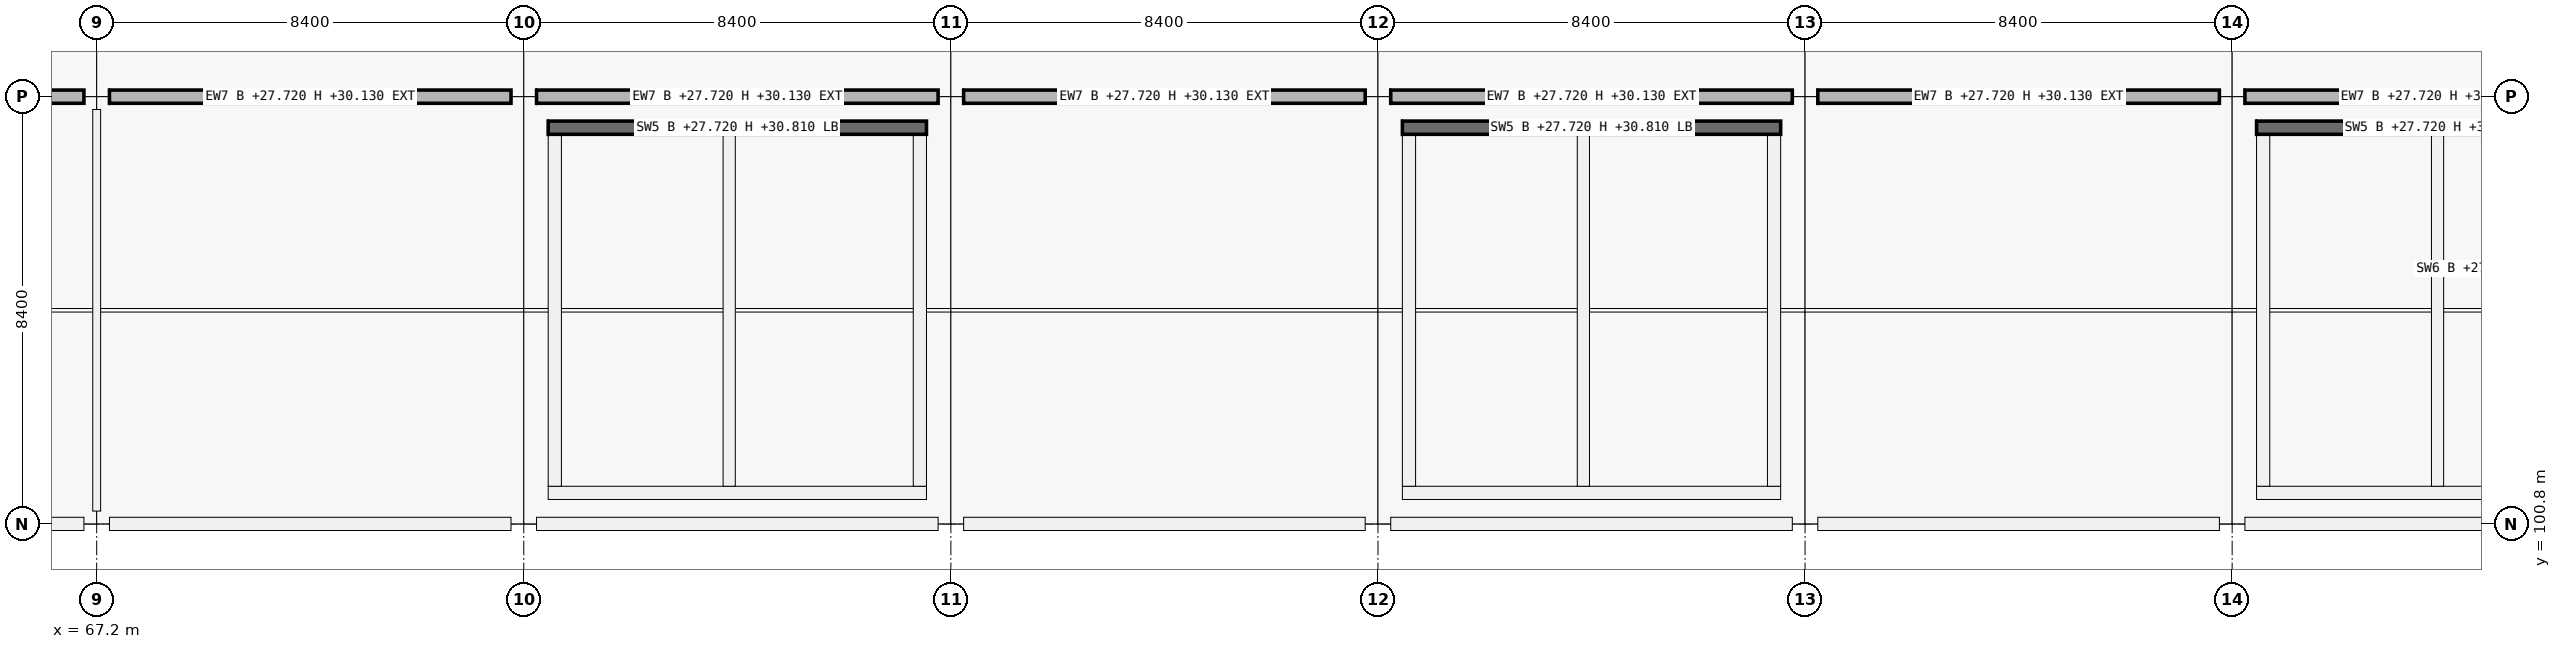
"""IFC4 building model, lengths in metres.
Left out: names, types, materials, properties, quantities, classifications, styles, units other than length and angle.
Written with IfcOpenShell. Run it as: python <this file> out.ifc"""

import sys

from ifc_helpers import new_model, si_unit, direction, frame, frame_2d, origin, origin_2d, place, context, subcontext, project, spatial, rectangle, extrude, element, fill, save


model = new_model("IFC4")
c1 = context("Model", 3, precision=1e-05, world=origin(), true_north=direction((0.0, 1.0)))
c2 = subcontext(c1, "Body", "Model", "MODEL_VIEW")
j1 = project(units=[si_unit("LENGTHUNIT", "METRE"), si_unit("PLANEANGLEUNIT", "RADIAN")], contexts=[c1])
p1 = place(None, origin())
s1 = spatial("IfcSite", under=j1, at=p1, CompositionType="ELEMENT")
p2 = place(p1, origin())
s2 = spatial("IfcBuilding", under=s1, at=p2, CompositionType="ELEMENT")
p3 = place(p2, frame((0.0, 0.0, 27.72)))
s3 = spatial("IfcBuildingStorey", under=s2, at=p3, CompositionType="ELEMENT", Elevation=27.72)
for number, where, z_axis, x_axis in (
    (1, (67.2, 100.8, 0.0), (0.0, 0.0, 1.0), (1.0, 0.0, 0.0)),
    (2, (67.2, 109.2, 0.0), (0.0, 0.0, 1.0), (1.0, 0.0, 0.0)),
    (3, (75.6, 100.8, 0.0), (0.0, 0.0, 1.0), (1.0, 0.0, 0.0)),
    (4, (75.6, 109.2, 0.0), (0.0, 0.0, 1.0), (1.0, 0.0, 0.0)),
    (5, (84.0, 100.8, 0.0), (0.0, 0.0, 1.0), (1.0, 0.0, 0.0)),
    (6, (84.0, 109.2, 0.0), (0.0, 0.0, 1.0), (1.0, 0.0, 0.0)),
    (7, (92.4, 100.8, 0.0), (0.0, 0.0, 1.0), (1.0, 0.0, 0.0)),
    (8, (92.4, 109.2, 0.0), (0.0, 0.0, 1.0), (1.0, 0.0, 0.0)),
    (9, (100.8, 100.8, 0.0), (0.0, 0.0, 1.0), (1.0, 0.0, 0.0)),
    (10, (100.8, 109.2, 0.0), (0.0, 0.0, 1.0), (1.0, 0.0, 0.0)),
    (11, (109.2, 100.8, 0.0), (0.0, 0.0, 1.0), (1.0, 0.0, 0.0)),
    (12, (109.2, 109.2, 0.0), (0.0, 0.0, 1.0), (1.0, 0.0, 0.0)),
):
    element("IfcColumn", number, at=place(p3, frame(where, z_axis=z_axis, x_axis=x_axis)), inside=s3, PredefinedType="COLUMN", context=c2, shape_type="SweptSolid", body=[
        extrude(rectangle(XDim=0.5, YDim=0.5, at=origin_2d()), origin(), (0.0, 0.0, 1.0), 3.09),
    ])
for number, where, z_axis, x_axis in (
    (13, (66.949, 100.8, 0.0), (0.0, 0.0, 1.0), (-1.0, 0.0, 0.0)),
    (14, (59.051, 109.2, 0.0), (0.0, 0.0, 1.0), (1.0, 0.0, 0.0)),
):
    element("IfcWall", number, at=place(p3, frame(where, z_axis=z_axis, x_axis=x_axis)), inside=s3, PredefinedType="SOLIDWALL", context=c2, shape_type="SweptSolid", body=[
        extrude(rectangle(XDim=7.898, YDim=0.26, at=frame_2d((3.949, 0.0))), origin(), (0.0, 0.0, 1.0), 2.41),
    ])
for number, where, z_axis, x_axis in (
    (15, (75.349, 100.8, 0.0), (0.0, 0.0, 1.0), (-1.0, 0.0, 0.0)),
    (16, (67.451, 109.2, 0.0), (0.0, 0.0, 1.0), (1.0, 0.0, 0.0)),
):
    element("IfcWall", number, at=place(p3, frame(where, z_axis=z_axis, x_axis=x_axis)), inside=s3, PredefinedType="SOLIDWALL", context=c2, shape_type="SweptSolid", body=[
        extrude(rectangle(XDim=7.898, YDim=0.26, at=frame_2d((3.949, 0.0))), origin(), (0.0, 0.0, 1.0), 2.41),
    ])
for number, where, z_axis, x_axis in (
    (17, (83.749, 100.8, 0.0), (0.0, 0.0, 1.0), (-1.0, 0.0, 0.0)),
    (18, (75.851, 109.2, 0.0), (0.0, 0.0, 1.0), (1.0, 0.0, 0.0)),
    (19, (92.149, 100.8, 0.0), (0.0, 0.0, 1.0), (-1.0, 0.0, 0.0)),
    (20, (84.251, 109.2, 0.0), (0.0, 0.0, 1.0), (1.0, 0.0, 0.0)),
):
    element("IfcWall", number, at=place(p3, frame(where, z_axis=z_axis, x_axis=x_axis)), inside=s3, PredefinedType="SOLIDWALL", context=c2, shape_type="SweptSolid", body=[
        extrude(rectangle(XDim=7.898, YDim=0.26, at=frame_2d((3.949, 0.0))), origin(), (0.0, 0.0, 1.0), 2.41),
    ])
for number, where, z_axis, x_axis in (
    (21, (100.549, 100.8, 0.0), (0.0, 0.0, 1.0), (-1.0, 0.0, 0.0)),
    (22, (92.651, 109.2, 0.0), (0.0, 0.0, 1.0), (1.0, 0.0, 0.0)),
):
    element("IfcWall", number, at=place(p3, frame(where, z_axis=z_axis, x_axis=x_axis)), inside=s3, PredefinedType="SOLIDWALL", context=c2, shape_type="SweptSolid", body=[
        extrude(rectangle(XDim=7.898, YDim=0.26, at=frame_2d((3.949, 0.0))), origin(), (0.0, 0.0, 1.0), 2.41),
    ])
for number, where, z_axis, x_axis in (
    (23, (108.949, 100.8, 0.0), (0.0, 0.0, 1.0), (-1.0, 0.0, 0.0)),
    (24, (101.051, 109.2, 0.0), (0.0, 0.0, 1.0), (1.0, 0.0, 0.0)),
):
    element("IfcWall", number, at=place(p3, frame(where, z_axis=z_axis, x_axis=x_axis)), inside=s3, PredefinedType="SOLIDWALL", context=c2, shape_type="SweptSolid", body=[
        extrude(rectangle(XDim=7.898, YDim=0.26, at=frame_2d((3.949, 0.0))), origin(), (0.0, 0.0, 1.0), 2.41),
    ])
for number, where, z_axis, x_axis in (
    (25, (117.349, 100.8, 0.0), (0.0, 0.0, 1.0), (-1.0, 0.0, 0.0)),
    (26, (109.451, 109.2, 0.0), (0.0, 0.0, 1.0), (1.0, 0.0, 0.0)),
):
    element("IfcWall", number, at=place(p3, frame(where, z_axis=z_axis, x_axis=x_axis)), inside=s3, PredefinedType="SOLIDWALL", context=c2, shape_type="SweptSolid", body=[
        extrude(rectangle(XDim=7.898, YDim=0.26, at=frame_2d((3.949, 0.0))), origin(), (0.0, 0.0, 1.0), 2.41),
    ])
p4 = place(p3, frame((117.12, 101.41, 0.0), z_axis=(0.0, 0.0, 1.0), x_axis=(-1.0, 0.0, 0.0)))
e27 = element("IfcWall", 27, at=p4, inside=s3, PredefinedType="SHEAR", context=c2, shape_type="SweptSolid", body=[
    extrude(rectangle(XDim=7.44, YDim=0.26, at=frame_2d((3.72, 0.0))), origin(), (0.0, 0.0, 1.0), 3.09),
])
p5 = place(p3, frame((109.81, 101.54, 0.0), z_axis=(0.0, 0.0, 1.0), x_axis=(0.0, 1.0, 0.0)))
e28 = element("IfcWall", 28, at=p5, inside=s3, PredefinedType="SHEAR", context=c2, shape_type="SweptSolid", body=[
    extrude(rectangle(XDim=6.92, YDim=0.26, at=frame_2d((3.46, 0.0))), origin(), (0.0, 0.0, 1.0), 3.09),
])
p6 = place(p3, frame((109.68, 108.59, 0.0), z_axis=(0.0, 0.0, 1.0), x_axis=(1.0, 0.0, 0.0)))
e29 = element("IfcWall", 29, at=p6, inside=s3, PredefinedType="SHEAR", context=c2, shape_type="SweptSolid", body=[
    extrude(rectangle(XDim=7.44, YDim=0.26, at=frame_2d((3.72, 0.0))), origin(), (0.0, 0.0, 1.0), 3.09),
])
p7 = place(p3, frame((113.24, 101.54, 0.0), z_axis=(0.0, 0.0, 1.0), x_axis=(0.0, 1.0, 0.0)))
e30 = element("IfcWall", 30, at=p7, inside=s3, PredefinedType="SHEAR", context=c2, shape_type="SweptSolid", body=[
    extrude(rectangle(XDim=6.92, YDim=0.24, at=frame_2d((3.46, 0.0))), origin(), (0.0, 0.0, 1.0), 3.09),
])
p8 = place(p7, frame((0.12, 0.0, 0.0)))
e31 = element("IfcOpeningElement", 31, at=p8, cuts=e30, PredefinedType="OPENING", context=c2, shape_type="SweptSolid", body=[
    extrude(rectangle(XDim=1.0, YDim=2.15, at=frame_2d((0.5, 1.075))), frame((0.0, 0.12, 0.0), z_axis=(0.0, -1.0, 0.0), x_axis=(1.0, 0.0, 0.0)), (0.0, 0.0, 1.0), 0.24),
])
p9 = place(p3, frame((113.36, 105.82, 0.0), z_axis=(0.0, 0.0, 1.0), x_axis=(1.0, 0.0, 0.0)))
e32 = element("IfcWall", 32, at=p9, inside=s3, PredefinedType="SHEAR", context=c2, shape_type="SweptSolid", body=[
    extrude(rectangle(XDim=3.5, YDim=0.24, at=frame_2d((1.75, 0.0))), origin(), (0.0, 0.0, 1.0), 3.09),
])
p10 = place(p9, frame((1.15, 0.0, 0.0)))
e33 = element("IfcOpeningElement", 33, at=p10, cuts=e32, PredefinedType="OPENING", context=c2, shape_type="SweptSolid", body=[
    extrude(rectangle(XDim=1.2, YDim=2.2, at=frame_2d((0.6, 1.1))), frame((0.0, 0.12, 0.0), z_axis=(0.0, -1.0, 0.0), x_axis=(1.0, 0.0, 0.0)), (0.0, 0.0, 1.0), 0.24),
])
p11 = place(p3, frame((83.52, 101.41, 0.0), z_axis=(0.0, 0.0, 1.0), x_axis=(-1.0, 0.0, 0.0)))
e34 = element("IfcWall", 34, at=p11, inside=s3, PredefinedType="SHEAR", context=c2, shape_type="SweptSolid", body=[
    extrude(rectangle(XDim=7.44, YDim=0.26, at=frame_2d((3.72, 0.0))), origin(), (0.0, 0.0, 1.0), 3.09),
])
p12 = place(p3, frame((76.21, 101.54, 0.0), z_axis=(0.0, 0.0, 1.0), x_axis=(0.0, 1.0, 0.0)))
e35 = element("IfcWall", 35, at=p12, inside=s3, PredefinedType="SHEAR", context=c2, shape_type="SweptSolid", body=[
    extrude(rectangle(XDim=6.92, YDim=0.26, at=frame_2d((3.46, 0.0))), origin(), (0.0, 0.0, 1.0), 3.09),
])
p13 = place(p3, frame((76.08, 108.59, 0.0), z_axis=(0.0, 0.0, 1.0), x_axis=(1.0, 0.0, 0.0)))
e36 = element("IfcWall", 36, at=p13, inside=s3, PredefinedType="SHEAR", context=c2, shape_type="SweptSolid", body=[
    extrude(rectangle(XDim=7.44, YDim=0.26, at=frame_2d((3.72, 0.0))), origin(), (0.0, 0.0, 1.0), 3.09),
])
p14 = place(p3, frame((83.39, 108.46, 0.0), z_axis=(0.0, 0.0, 1.0), x_axis=(0.0, -1.0, 0.0)))
e37 = element("IfcWall", 37, at=p14, inside=s3, PredefinedType="SHEAR", context=c2, shape_type="SweptSolid", body=[
    extrude(rectangle(XDim=6.92, YDim=0.26, at=frame_2d((3.46, 0.0))), origin(), (0.0, 0.0, 1.0), 3.09),
])
p15 = place(p14, frame((4.01, 0.0, 0.0)))
e38 = element("IfcOpeningElement", 38, at=p15, cuts=e37, PredefinedType="OPENING", context=c2, shape_type="SweptSolid", body=[
    extrude(rectangle(XDim=1.5, YDim=2.15, at=frame_2d((0.75, 1.075))), frame((0.0, 0.13, 0.0), z_axis=(0.0, -1.0, 0.0), x_axis=(1.0, 0.0, 0.0)), (0.0, 0.0, 1.0), 0.26),
])
p16 = place(p3, frame((79.64, 101.54, 0.0), z_axis=(0.0, 0.0, 1.0), x_axis=(0.0, 1.0, 0.0)))
e39 = element("IfcWall", 39, at=p16, inside=s3, PredefinedType="SHEAR", context=c2, shape_type="SweptSolid", body=[
    extrude(rectangle(XDim=6.92, YDim=0.24, at=frame_2d((3.46, 0.0))), origin(), (0.0, 0.0, 1.0), 3.09),
])
p17 = place(p16, frame((0.12, 0.0, 0.0)))
e40 = element("IfcOpeningElement", 40, at=p17, cuts=e39, PredefinedType="OPENING", context=c2, shape_type="SweptSolid", body=[
    extrude(rectangle(XDim=1.0, YDim=2.15, at=frame_2d((0.5, 1.075))), frame((0.0, 0.12, 0.0), z_axis=(0.0, -1.0, 0.0), x_axis=(1.0, 0.0, 0.0)), (0.0, 0.0, 1.0), 0.24),
])
p18 = place(p3, frame((100.32, 101.41, 0.0), z_axis=(0.0, 0.0, 1.0), x_axis=(-1.0, 0.0, 0.0)))
e41 = element("IfcWall", 41, at=p18, inside=s3, PredefinedType="SHEAR", context=c2, shape_type="SweptSolid", body=[
    extrude(rectangle(XDim=7.44, YDim=0.26, at=frame_2d((3.72, 0.0))), origin(), (0.0, 0.0, 1.0), 3.09),
])
p19 = place(p3, frame((93.01, 101.54, 0.0), z_axis=(0.0, 0.0, 1.0), x_axis=(0.0, 1.0, 0.0)))
e42 = element("IfcWall", 42, at=p19, inside=s3, PredefinedType="SHEAR", context=c2, shape_type="SweptSolid", body=[
    extrude(rectangle(XDim=6.92, YDim=0.26, at=frame_2d((3.46, 0.0))), origin(), (0.0, 0.0, 1.0), 3.09),
])
p20 = place(p3, frame((92.88, 108.59, 0.0), z_axis=(0.0, 0.0, 1.0), x_axis=(1.0, 0.0, 0.0)))
e43 = element("IfcWall", 43, at=p20, inside=s3, PredefinedType="SHEAR", context=c2, shape_type="SweptSolid", body=[
    extrude(rectangle(XDim=7.44, YDim=0.26, at=frame_2d((3.72, 0.0))), origin(), (0.0, 0.0, 1.0), 3.09),
])
p21 = place(p3, frame((100.19, 108.46, 0.0), z_axis=(0.0, 0.0, 1.0), x_axis=(0.0, -1.0, 0.0)))
e44 = element("IfcWall", 44, at=p21, inside=s3, PredefinedType="SHEAR", context=c2, shape_type="SweptSolid", body=[
    extrude(rectangle(XDim=6.92, YDim=0.26, at=frame_2d((3.46, 0.0))), origin(), (0.0, 0.0, 1.0), 3.09),
])
p22 = place(p21, frame((4.01, 0.0, 0.0)))
e45 = element("IfcOpeningElement", 45, at=p22, cuts=e44, PredefinedType="OPENING", context=c2, shape_type="SweptSolid", body=[
    extrude(rectangle(XDim=1.5, YDim=2.15, at=frame_2d((0.75, 1.075))), frame((0.0, 0.13, 0.0), z_axis=(0.0, -1.0, 0.0), x_axis=(1.0, 0.0, 0.0)), (0.0, 0.0, 1.0), 0.26),
])
p23 = place(p3, frame((96.44, 101.54, 0.0), z_axis=(0.0, 0.0, 1.0), x_axis=(0.0, 1.0, 0.0)))
e46 = element("IfcWall", 46, at=p23, inside=s3, PredefinedType="SHEAR", context=c2, shape_type="SweptSolid", body=[
    extrude(rectangle(XDim=6.92, YDim=0.24, at=frame_2d((3.46, 0.0))), origin(), (0.0, 0.0, 1.0), 3.09),
])
p24 = place(p23, frame((0.12, 0.0, 0.0)))
e47 = element("IfcOpeningElement", 47, at=p24, cuts=e46, PredefinedType="OPENING", context=c2, shape_type="SweptSolid", body=[
    extrude(rectangle(XDim=1.0, YDim=2.15, at=frame_2d((0.5, 1.075))), frame((0.0, 0.12, 0.0), z_axis=(0.0, -1.0, 0.0), x_axis=(1.0, 0.0, 0.0)), (0.0, 0.0, 1.0), 0.24),
])
p25 = place(p3, frame((67.2, 101.052, 0.0), z_axis=(0.0, 0.0, 1.0), x_axis=(0.0, 1.0, 0.0)))
e48 = element("IfcWall", 48, at=p25, inside=s3, PredefinedType="PARTITIONING", context=c2, shape_type="SweptSolid", body=[
    extrude(rectangle(XDim=7.896, YDim=0.155, at=frame_2d((3.948, 0.0))), origin(), (0.0, 0.0, 1.0), 2.5),
])
p26 = place(p25, frame((3.098, 0.0, 0.0)))
e49 = element("IfcOpeningElement", 49, at=p26, cuts=e48, PredefinedType="OPENING", context=c2, shape_type="SweptSolid", body=[
    extrude(rectangle(XDim=1.7, YDim=2.32, at=frame_2d((0.85, 1.16))), frame((0.0, 0.078, 0.0), z_axis=(0.0, -1.0, 0.0), x_axis=(1.0, 0.0, 0.0)), (0.0, 0.0, 1.0), 0.155),
])
p27 = place(p8, origin())
e50 = element("IfcDoor", 50, at=p27, inside=s3, OperationType="SINGLE_SWING_LEFT", PredefinedType="DOOR", context=c2, shape_type="SweptSolid", body=[
    extrude(rectangle(XDim=1.0, YDim=2.15, at=frame_2d((0.5, 1.075))), frame((0.0, 0.025, 0.0), z_axis=(0.0, -1.0, 0.0), x_axis=(1.0, 0.0, 0.0)), (0.0, 0.0, 1.0), 0.05),
])
fill(e31, e50)
p28 = place(p17, origin())
e51 = element("IfcDoor", 51, at=p28, inside=s3, OperationType="SINGLE_SWING_RIGHT", PredefinedType="DOOR", context=c2, shape_type="SweptSolid", body=[
    extrude(rectangle(XDim=1.0, YDim=2.15, at=frame_2d((0.5, 1.075))), frame((0.0, 0.025, 0.0), z_axis=(0.0, -1.0, 0.0), x_axis=(1.0, 0.0, 0.0)), (0.0, 0.0, 1.0), 0.05),
])
fill(e40, e51)
p29 = place(p15, origin())
e52 = element("IfcDoor", 52, at=p29, inside=s3, OperationType="DOUBLE_DOOR_SINGLE_SWING", PredefinedType="DOOR", context=c2, shape_type="SweptSolid", body=[
    extrude(rectangle(XDim=1.5, YDim=2.15, at=frame_2d((0.75, 1.075))), frame((0.0, 0.025, 0.0), z_axis=(0.0, -1.0, 0.0), x_axis=(1.0, 0.0, 0.0)), (0.0, 0.0, 1.0), 0.05),
])
fill(e38, e52)
p30 = place(p24, origin())
e53 = element("IfcDoor", 53, at=p30, inside=s3, OperationType="SINGLE_SWING_LEFT", PredefinedType="DOOR", context=c2, shape_type="SweptSolid", body=[
    extrude(rectangle(XDim=1.0, YDim=2.15, at=frame_2d((0.5, 1.075))), frame((0.0, 0.025, 0.0), z_axis=(0.0, -1.0, 0.0), x_axis=(1.0, 0.0, 0.0)), (0.0, 0.0, 1.0), 0.05),
])
fill(e47, e53)
p31 = place(p22, origin())
e54 = element("IfcDoor", 54, at=p31, inside=s3, OperationType="DOUBLE_DOOR_SINGLE_SWING", PredefinedType="DOOR", context=c2, shape_type="SweptSolid", body=[
    extrude(rectangle(XDim=1.5, YDim=2.15, at=frame_2d((0.75, 1.075))), frame((0.0, 0.025, 0.0), z_axis=(0.0, -1.0, 0.0), x_axis=(1.0, 0.0, 0.0)), (0.0, 0.0, 1.0), 0.05),
])
fill(e45, e54)
p32 = place(p26, origin())
e55 = element("IfcDoor", 55, at=p32, inside=s3, OperationType="DOUBLE_DOOR_SINGLE_SWING", PredefinedType="DOOR", context=c2, shape_type="SweptSolid", body=[
    extrude(rectangle(XDim=1.7, YDim=2.32, at=frame_2d((0.85, 1.16))), frame((0.0, 0.025, 0.0), z_axis=(0.0, -1.0, 0.0), x_axis=(1.0, 0.0, 0.0)), (0.0, 0.0, 1.0), 0.05),
])
fill(e49, e55)
save(model, sys.argv[1])
